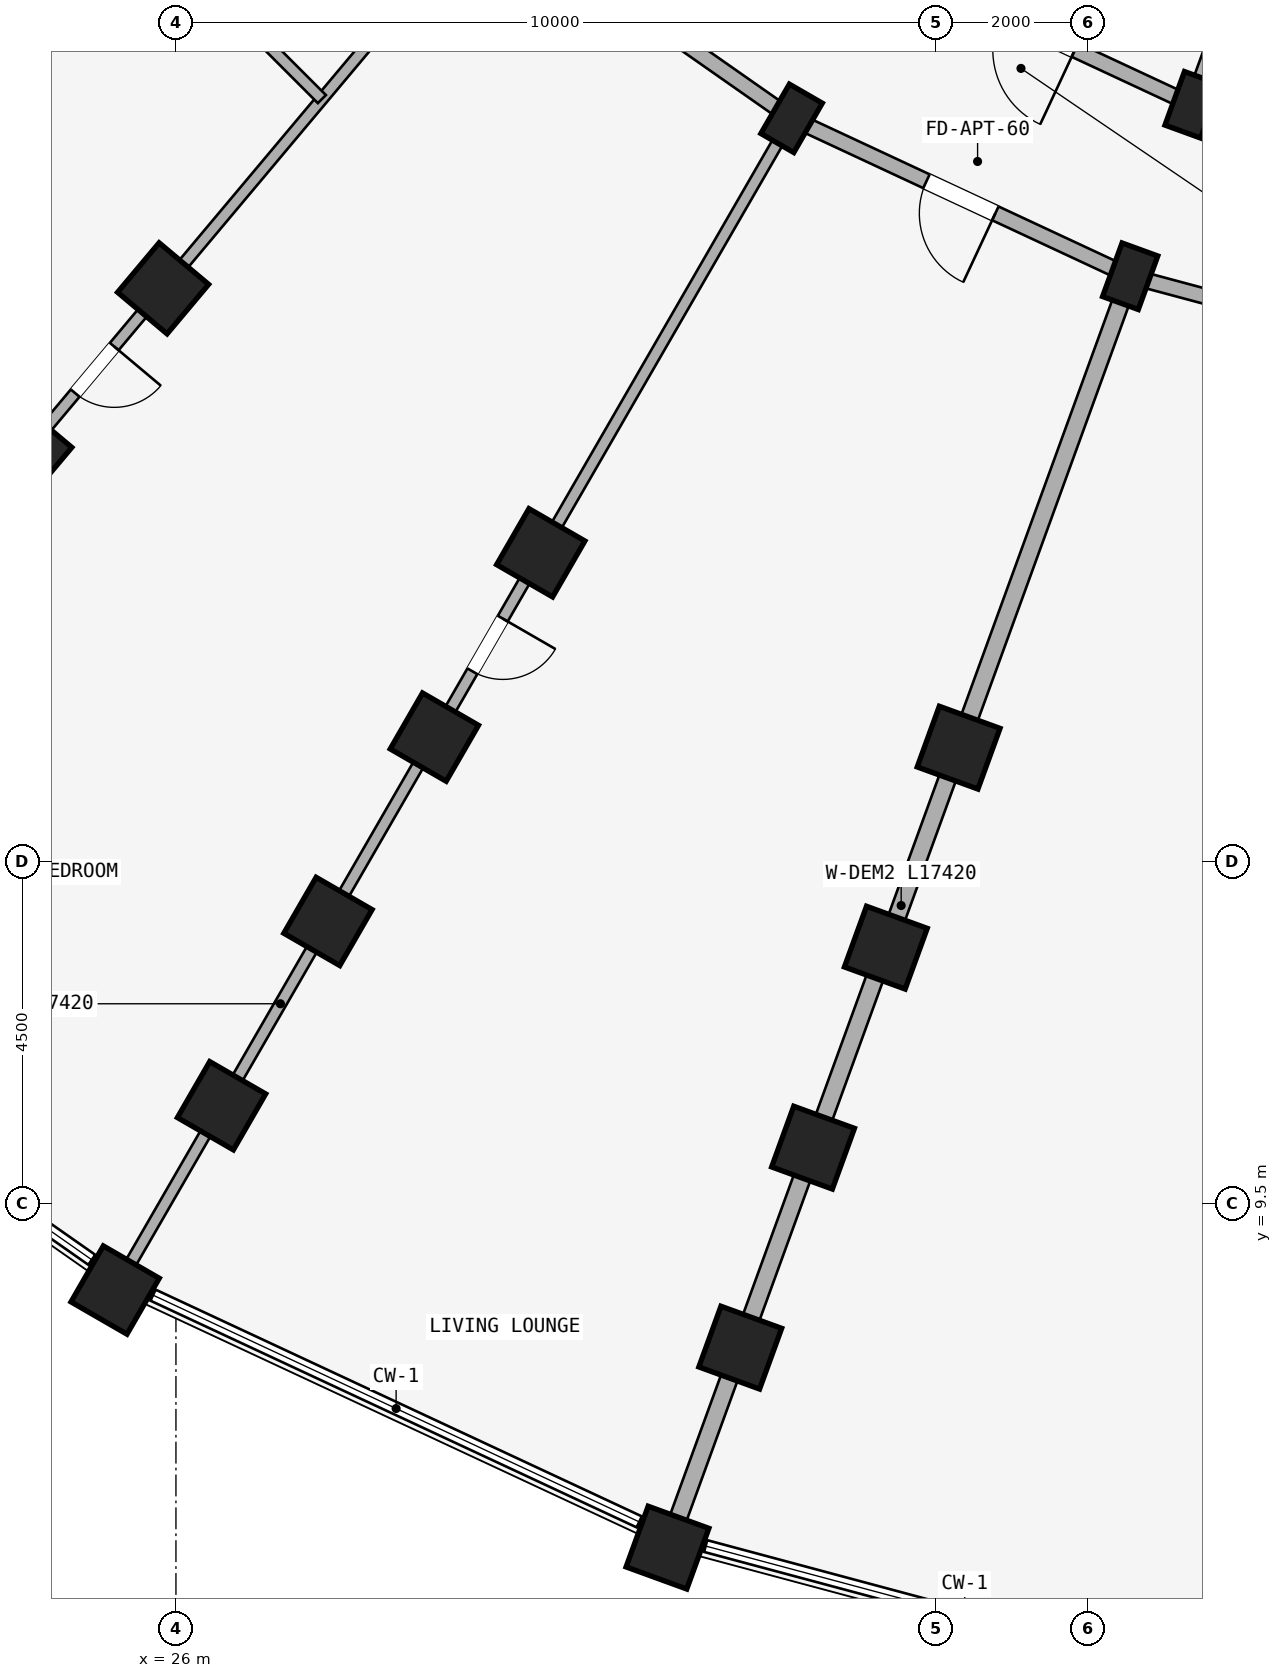
"""IFC4 building model, lengths in metres.
Left out: names, types, materials, properties, quantities, classifications, styles, units other than length and angle.
Written with IfcOpenShell. Run it as: python <this file> out.ifc"""

import sys

from ifc_helpers import new_model, si_unit, direction, frame, frame_2d, origin, origin_2d, place, context, subcontext, project, spatial, rectangle, extrude, element, fill, save


model = new_model("IFC4")
c1 = context("Model", 3, precision=1e-05, world=origin(), true_north=direction((0.0, 1.0)))
c2 = subcontext(c1, "Body", "Model", "MODEL_VIEW")
j1 = project(units=[si_unit("LENGTHUNIT", "METRE"), si_unit("PLANEANGLEUNIT", "RADIAN")], contexts=[c1])
p1 = place(None, origin())
s1 = spatial("IfcSite", under=j1, at=p1, CompositionType="ELEMENT")
p2 = place(p1, origin())
s2 = spatial("IfcBuilding", under=s1, at=p2, CompositionType="ELEMENT")
p3 = place(p2, frame((0.0, 0.0, 4.5)))
s3 = spatial("IfcBuildingStorey", under=s2, at=p3, CompositionType="ELEMENT", Elevation=4.5)
for number, where, z_axis, x_axis in (
    (1, (39.376, 23.956, 0.0), (0.0, 0.0, 1.0), (-0.94, 0.342, 0.0)),
    (2, (38.555, 21.701, 0.0), (0.0, 0.0, 1.0), (-0.94, 0.342, 0.0)),
):
    element("IfcColumn", number, at=place(p3, frame(where, z_axis=z_axis, x_axis=x_axis)), inside=s3, PredefinedType="COLUMN", context=c2, shape_type="SweptSolid", body=[
        extrude(rectangle(XDim=0.5, YDim=0.75, at=origin_2d()), origin(), (0.0, 0.0, 1.0), 3.98),
    ])
for number, where, z_axis, x_axis in (
    (3, (36.298, 15.499, 0.0), (0.0, 0.0, 1.0), (-0.94, 0.342, 0.0)),
    (4, (35.34, 12.868, 0.0), (0.0, 0.0, 1.0), (-0.94, 0.342, 0.0)),
    (5, (34.382, 10.236, 0.0), (0.0, 0.0, 1.0), (-0.94, 0.342, 0.0)),
    (6, (33.425, 7.605, 0.0), (0.0, 0.0, 1.0), (-0.94, 0.342, 0.0)),
    (7, (32.467, 4.974, 0.0), (0.0, 0.0, 1.0), (-0.94, 0.342, 0.0)),
):
    element("IfcColumn", number, at=place(p3, frame(where, z_axis=z_axis, x_axis=x_axis)), inside=s3, PredefinedType="COLUMN", context=c2, shape_type="SweptSolid", body=[
        extrude(rectangle(XDim=0.85, YDim=0.85, at=origin_2d()), origin(), (0.0, 0.0, 1.0), 3.98),
    ])
p4 = place(p3, frame((34.1, 23.778, 0.0), z_axis=(0.0, 0.0, 1.0), x_axis=(-0.866025403784, 0.5, 0.0)))
e8 = element("IfcColumn", 8, at=p4, inside=s3, PredefinedType="COLUMN", context=c2, shape_type="SweptSolid", body=[
    extrude(rectangle(XDim=0.5, YDim=0.75, at=origin_2d()), origin(), (0.0, 0.0, 1.0), 3.98),
])
for number, where, z_axis, x_axis in (
    (9, (30.8, 18.062, 0.0), (0.0, 0.0, 1.0), (-0.866, 0.5, 0.0)),
    (10, (29.4, 15.637, 0.0), (0.0, 0.0, 1.0), (-0.866, 0.5, 0.0)),
    (11, (28.0, 13.213, 0.0), (0.0, 0.0, 1.0), (-0.866, 0.5, 0.0)),
    (12, (26.6, 10.788, 0.0), (0.0, 0.0, 1.0), (-0.866, 0.5, 0.0)),
    (13, (25.2, 8.363, 0.0), (0.0, 0.0, 1.0), (-0.866, 0.5, 0.0)),
    (14, (25.831, 21.542, 0.0), (0.0, 0.0, 1.0), (-0.766, 0.643, 0.0)),
    (15, (24.031, 19.397, 0.0), (0.0, 0.0, 1.0), (-0.766, 0.643, 0.0)),
):
    element("IfcColumn", number, at=place(p3, frame(where, z_axis=z_axis, x_axis=x_axis)), inside=s3, PredefinedType="COLUMN", context=c2, shape_type="SweptSolid", body=[
        extrude(rectangle(XDim=0.85, YDim=0.85, at=origin_2d()), origin(), (0.0, 0.0, 1.0), 3.98),
    ])
p5 = place(p3, frame((43.72, 22.792, 0.0), z_axis=(0.0, 0.0, 1.0), x_axis=(-0.965934240054, 0.258787642463, 0.0)))
e16 = element("IfcWall", 16, at=p5, inside=s3, PredefinedType="STANDARD", context=c2, shape_type="SweptSolid", body=[
    extrude(rectangle(XDim=4.497, YDim=0.2, at=frame_2d((2.249, 0.0))), origin(), (0.0, 0.0, 1.0), 3.322),
])
p6 = place(p3, frame((43.303, 20.428, 0.0), z_axis=(0.0, 0.0, 1.0), x_axis=(-0.965930095386, 0.258803112091, 0.0)))
e17 = element("IfcWall", 17, at=p6, inside=s3, PredefinedType="STANDARD", context=c2, shape_type="SweptSolid", body=[
    extrude(rectangle(XDim=4.916, YDim=0.2, at=frame_2d((2.458, 0.0))), origin(), (0.0, 0.0, 1.0), 3.322),
])
p7 = place(p3, frame((39.376, 23.956, 0.0), z_axis=(0.0, 0.0, 1.0), x_axis=(-0.906307919131, 0.422617978463, 0.0)))
e18 = element("IfcWall", 18, at=p7, inside=s3, PredefinedType="STANDARD", context=c2, shape_type="SweptSolid", body=[
    extrude(rectangle(XDim=4.497, YDim=0.2, at=frame_2d((2.249, 0.0))), origin(), (0.0, 0.0, 1.0), 3.322),
])
p8 = place(p7, frame((1.709, 0.0, 0.0)))
e19 = element("IfcOpeningElement", 19, at=p8, cuts=e18, PredefinedType="OPENING", context=c2, shape_type="SweptSolid", body=[
    extrude(rectangle(XDim=1.08, YDim=2.15, at=frame_2d((0.54, 1.075))), frame((0.0, 0.11, 0.0), z_axis=(0.0, -1.0, 0.0), x_axis=(1.0, 0.0, 0.0)), (0.0, 0.0, 1.0), 0.22),
])
p9 = place(p3, frame((38.555, 21.701, 0.0), z_axis=(0.0, 0.0, 1.0), x_axis=(-0.906302381024, 0.422629854778, 0.0)))
e20 = element("IfcWall", 20, at=p9, inside=s3, PredefinedType="STANDARD", context=c2, shape_type="SweptSolid", body=[
    extrude(rectangle(XDim=4.915, YDim=0.2, at=frame_2d((2.458, 0.0))), origin(), (0.0, 0.0, 1.0), 3.322),
])
p10 = place(p9, frame((1.958, 0.0, 0.0)))
e21 = element("IfcOpeningElement", 21, at=p10, cuts=e20, PredefinedType="OPENING", context=c2, shape_type="SweptSolid", body=[
    extrude(rectangle(XDim=1.0, YDim=2.15, at=frame_2d((0.5, 1.075))), frame((0.0, 0.11, 0.0), z_axis=(0.0, -1.0, 0.0), x_axis=(1.0, 0.0, 0.0)), (0.0, 0.0, 1.0), 0.22),
])
p11 = place(p3, frame((34.1, 23.778, 0.0), z_axis=(0.0, 0.0, 1.0), x_axis=(-0.819140911474, 0.573592335331, 0.0)))
e22 = element("IfcWall", 22, at=p11, inside=s3, PredefinedType="STANDARD", context=c2, shape_type="SweptSolid", body=[
    extrude(rectangle(XDim=4.916, YDim=0.2, at=frame_2d((2.458, 0.0))), origin(), (0.0, 0.0, 1.0), 3.322),
])
p12 = place(p3, frame((41.702, 30.346, 0.0), z_axis=(0.0, 0.0, 1.0), x_axis=(-0.342010221662, -0.939696231917, 0.0)))
e23 = element("IfcWall", 23, at=p12, inside=s3, PredefinedType="STANDARD", context=c2, shape_type="SweptSolid", body=[
    extrude(rectangle(XDim=6.75, YDim=0.22, at=frame_2d((3.375, 0.0))), origin(), (0.0, 0.0, 1.0), 3.322),
])
p13 = place(p3, frame((38.521, 21.607, 0.0), z_axis=(0.0, 0.0, 1.0), x_axis=(-0.342022120477, -0.939691901159, 0.0)))
e24 = element("IfcWall", 24, at=p13, inside=s3, PredefinedType="STANDARD", context=c2, shape_type="SweptSolid", body=[
    extrude(rectangle(XDim=17.42, YDim=0.23, at=frame_2d((8.71, 0.0))), origin(), (0.0, 0.0, 1.0), 3.322),
])
p14 = place(p3, frame((34.05, 23.691, 0.0), z_axis=(0.0, 0.0, 1.0), x_axis=(-0.499997843263, -0.866026648973, 0.0)))
e25 = element("IfcWall", 25, at=p14, inside=s3, PredefinedType="PARTITIONING", context=c2, shape_type="SweptSolid", body=[
    extrude(rectangle(XDim=17.42, YDim=0.15, at=frame_2d((8.71, 0.0))), origin(), (0.0, 0.0, 1.0), 3.322),
])
p15 = place(p14, frame((7.5, 0.0, 0.0)))
e26 = element("IfcOpeningElement", 26, at=p15, cuts=e25, PredefinedType="OPENING", context=c2, shape_type="SweptSolid", body=[
    extrude(rectangle(XDim=0.8, YDim=2.1, at=frame_2d((0.4, 1.05))), frame((0.0, 0.085, 0.0), z_axis=(0.0, -1.0, 0.0), x_axis=(1.0, 0.0, 0.0)), (0.0, 0.0, 1.0), 0.17),
])
p16 = place(p3, frame((30.009, 26.521, 0.0), z_axis=(0.0, 0.0, 1.0), x_axis=(-0.642784757967, -0.766046835987, 0.0)))
e27 = element("IfcWall", 27, at=p16, inside=s3, PredefinedType="PARTITIONING", context=c2, shape_type="SweptSolid", body=[
    extrude(rectangle(XDim=17.42, YDim=0.15, at=frame_2d((8.71, 0.0))), origin(), (0.0, 0.0, 1.0), 3.322),
])
p17 = place(p16, frame((7.5, 0.0, 0.0)))
e28 = element("IfcOpeningElement", 28, at=p17, cuts=e27, PredefinedType="OPENING", context=c2, shape_type="SweptSolid", body=[
    extrude(rectangle(XDim=0.8, YDim=2.1, at=frame_2d((0.4, 1.05))), frame((0.0, 0.085, 0.0), z_axis=(0.0, -1.0, 0.0), x_axis=(1.0, 0.0, 0.0)), (0.0, 0.0, 1.0), 0.17),
])
p18 = place(p3, frame((26.521, 30.009, 0.0), z_axis=(0.0, 0.0, 1.0), x_axis=(-0.766046835987, -0.642784757967, 0.0)))
e29 = element("IfcWall", 29, at=p18, inside=s3, PredefinedType="STANDARD", context=c2, shape_type="SweptSolid", body=[
    extrude(rectangle(XDim=17.42, YDim=0.23, at=frame_2d((8.71, 0.0))), origin(), (0.0, 0.0, 1.0), 3.322),
])
p19 = place(p3, frame((27.92, 24.031, 0.0), z_axis=(0.0, 0.0, 1.0), x_axis=(-0.707106781187, 0.707106781187, 0.0)))
e30 = element("IfcWall", 30, at=p19, inside=s3, PredefinedType="PLUMBINGWALL", context=c2, shape_type="SweptSolid", body=[
    extrude(rectangle(XDim=5.5, YDim=0.15, at=frame_2d((2.75, 0.0))), origin(), (0.0, 0.0, 1.0), 3.322),
])
p20 = place(p19, frame((2.37, 0.0, 0.0)))
e31 = element("IfcOpeningElement", 31, at=p20, cuts=e30, PredefinedType="OPENING", context=c2, shape_type="SweptSolid", body=[
    extrude(rectangle(XDim=0.76, YDim=2.05, at=frame_2d((0.38, 1.025))), frame((0.0, 0.085, 0.0), z_axis=(0.0, -1.0, 0.0), x_axis=(1.0, 0.0, 0.0)), (0.0, 0.0, 1.0), 0.17),
])
p21 = place(p15, frame((0.8, 0.0, 0.0), z_axis=(0.0, 0.0, 1.0), x_axis=(-1.0, 0.0, 0.0)))
e32 = element("IfcDoor", 32, at=p21, inside=s3, OperationType="SINGLE_SWING_RIGHT", PredefinedType="DOOR", context=c2, shape_type="SweptSolid", body=[
    extrude(rectangle(XDim=0.8, YDim=2.1, at=frame_2d((0.4, 1.05))), frame((0.0, 0.025, 0.0), z_axis=(0.0, -1.0, 0.0), x_axis=(1.0, 0.0, 0.0)), (0.0, 0.0, 1.0), 0.05),
])
fill(e26, e32)
p22 = place(p17, frame((0.8, 0.0, 0.0), z_axis=(0.0, 0.0, 1.0), x_axis=(-1.0, 0.0, 0.0)))
e33 = element("IfcDoor", 33, at=p22, inside=s3, OperationType="SINGLE_SWING_RIGHT", PredefinedType="DOOR", context=c2, shape_type="SweptSolid", body=[
    extrude(rectangle(XDim=0.8, YDim=2.1, at=frame_2d((0.4, 1.05))), frame((0.0, 0.025, 0.0), z_axis=(0.0, -1.0, 0.0), x_axis=(1.0, 0.0, 0.0)), (0.0, 0.0, 1.0), 0.05),
])
fill(e28, e33)
p23 = place(p10, origin())
e34 = element("IfcDoor", 34, at=p23, inside=s3, OperationType="SINGLE_SWING_LEFT", PredefinedType="DOOR", context=c2, shape_type="SweptSolid", body=[
    extrude(rectangle(XDim=1.0, YDim=2.15, at=frame_2d((0.5, 1.075))), frame((0.0, 0.025, 0.0), z_axis=(0.0, -1.0, 0.0), x_axis=(1.0, 0.0, 0.0)), (0.0, 0.0, 1.0), 0.05),
])
fill(e21, e34)
save(model, sys.argv[1])
